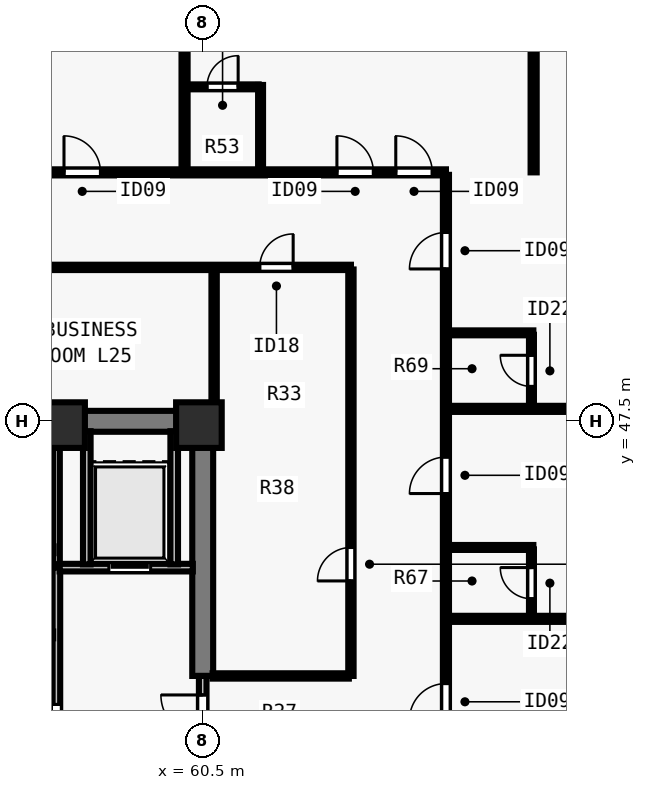
"""IFC4 building model, lengths in metres.
Left out: names, types, materials, properties, quantities, classifications, styles, units other than length and angle.
Written with IfcOpenShell. Run it as: python <this file> out.ifc"""

import sys

from ifc_helpers import new_model, si_unit, direction, frame, frame_2d, origin, origin_2d, place, context, subcontext, project, spatial, rectangle, extrude, element, fill, save


model = new_model("IFC4")
c1 = context("Model", 3, precision=1e-05, world=origin(), true_north=direction((0.0, 1.0)))
c2 = subcontext(c1, "Body", "Model", "MODEL_VIEW")
j1 = project(units=[si_unit("LENGTHUNIT", "METRE"), si_unit("PLANEANGLEUNIT", "RADIAN")], contexts=[c1])
p1 = place(None, origin())
s1 = spatial("IfcSite", under=j1, at=p1, CompositionType="ELEMENT")
p2 = place(p1, origin())
s2 = spatial("IfcBuilding", under=s1, at=p2, CompositionType="ELEMENT")
p3 = place(p2, frame((0.0, 0.0, 93.5)))
s3 = spatial("IfcBuildingStorey", under=s2, at=p3, CompositionType="ELEMENT", Elevation=93.5)
for number, where, z_axis, x_axis in (
    (1, (56.8, 47.4, 0.0), (0.0, 0.0, 1.0), (1.0, 0.0, 0.0)),
    (2, (60.4, 47.4, 0.0), (0.0, 0.0, 1.0), (1.0, 0.0, 0.0)),
):
    element("IfcColumn", number, at=place(p3, frame(where, z_axis=z_axis, x_axis=x_axis)), inside=s3, PredefinedType="COLUMN", context=c2, shape_type="SweptSolid", body=[
        extrude(rectangle(XDim=1.2, YDim=1.2, at=origin_2d()), origin(), (0.0, 0.0, 1.0), 3.5),
    ])
p4 = place(p3, frame((43.225, 47.5, 0.0), z_axis=(0.0, 0.0, 1.0), x_axis=(1.0, 0.0, 0.0)))
e3 = element("IfcWall", 3, at=p4, inside=s3, PredefinedType="SHEAR", context=c2, shape_type="SweptSolid", body=[
    extrude(rectangle(XDim=17.55, YDim=0.55, at=frame_2d((8.775, 0.0))), origin(), (0.0, 0.0, 1.0), 3.24),
])
p5 = place(p3, frame((60.5, 40.8, 0.0), z_axis=(0.0, 0.0, 1.0), x_axis=(0.0, 1.0, 0.0)))
e4 = element("IfcWall", 4, at=p5, inside=s3, PredefinedType="SHEAR", context=c2, shape_type="SweptSolid", body=[
    extrude(rectangle(XDim=6.435, YDim=0.55, at=frame_2d((3.218, 0.0))), origin(), (0.0, 0.0, 1.0), 3.24),
])
p6 = place(p3, frame((53.7, 40.5, 0.0), z_axis=(0.0, 0.0, 1.0), x_axis=(1.0, 0.0, 0.0)))
e5 = element("IfcWall", 5, at=p6, inside=s3, PredefinedType="SOLIDWALL", context=c2, shape_type="SweptSolid", body=[
    extrude(rectangle(XDim=2.95, YDim=0.2, at=frame_2d((1.475, 0.0))), origin(), (0.0, 0.0, 1.0), 3.24),
])
p7 = place(p3, frame((60.5, 38.75, 0.0), z_axis=(0.0, 0.0, 1.0), x_axis=(0.0, 1.0, 0.0)))
e6 = element("IfcWall", 6, at=p7, inside=s3, PredefinedType="SOLIDWALL", context=c2, shape_type="SweptSolid", body=[
    extrude(rectangle(XDim=2.05, YDim=0.2, at=frame_2d((1.025, 0.0))), origin(), (0.0, 0.0, 1.0), 3.24),
])
p8 = place(p7, frame((0.45, 0.0, 0.0)))
e7 = element("IfcOpeningElement", 7, at=p8, cuts=e6, PredefinedType="OPENING", context=c2, shape_type="SweptSolid", body=[
    extrude(rectangle(XDim=1.1, YDim=2.15, at=frame_2d((0.55, 1.075))), frame((0.0, 0.11, 0.0), z_axis=(0.0, -1.0, 0.0), x_axis=(1.0, 0.0, 0.0)), (0.0, 0.0, 1.0), 0.22),
])
p9 = place(p3, frame((56.65, 38.785, 0.0), z_axis=(0.0, 0.0, 1.0), x_axis=(0.0, 1.0, 0.0)))
e8 = element("IfcWall", 8, at=p9, inside=s3, PredefinedType="SOLIDWALL", context=c2, shape_type="SweptSolid", body=[
    extrude(rectangle(XDim=4.865, YDim=0.2, at=frame_2d((2.433, 0.0))), origin(), (0.0, 0.0, 1.0), 3.24),
])
p10 = place(p9, frame((0.265, 0.0, 0.0)))
e9 = element("IfcOpeningElement", 9, at=p10, cuts=e8, PredefinedType="OPENING", context=c2, shape_type="SweptSolid", body=[
    extrude(rectangle(XDim=1.0, YDim=2.15, at=frame_2d((0.5, 1.075))), frame((0.0, 0.11, 0.0), z_axis=(0.0, -1.0, 0.0), x_axis=(1.0, 0.0, 0.0)), (0.0, 0.0, 1.0), 0.22),
])
p11 = place(p3, frame((56.735, 43.65, 0.0), z_axis=(0.0, 0.0, 1.0), x_axis=(1.0, 0.0, 0.0)))
e10 = element("IfcWall", 10, at=p11, inside=s3, PredefinedType="SOLIDWALL", context=c2, shape_type="SweptSolid", body=[
    extrude(rectangle(XDim=3.505, YDim=0.2, at=frame_2d((1.752, 0.0))), origin(), (0.0, 0.0, 1.0), 3.24),
])
p12 = place(p11, frame((1.295, 0.0, 0.0)))
e11 = element("IfcOpeningElement", 11, at=p12, cuts=e10, PredefinedType="OPENING", context=c2, shape_type="SweptSolid", body=[
    extrude(rectangle(XDim=1.1, YDim=2.2, at=frame_2d((0.55, 1.1))), frame((0.0, 0.11, 0.0), z_axis=(0.0, -1.0, 0.0), x_axis=(1.0, 0.0, 0.0)), (0.0, 0.0, 1.0), 0.22),
])
for number, where, z_axis, x_axis in (
    (12, (57.45, 43.735, 0.0), (0.0, 0.0, 1.0), (0.0, 1.0, 0.0)),
    (13, (59.75, 43.735, 0.0), (0.0, 0.0, 1.0), (0.0, 1.0, 0.0)),
):
    element("IfcWall", number, at=place(p3, frame(where, z_axis=z_axis, x_axis=x_axis)), inside=s3, PredefinedType="SOLIDWALL", context=c2, shape_type="SweptSolid", body=[
        extrude(rectangle(XDim=3.505, YDim=0.2, at=frame_2d((1.752, 0.0))), origin(), (0.0, 0.0, 1.0), 3.24),
    ])
p13 = place(p3, frame((56.65, 43.735, 0.0), z_axis=(0.0, 0.0, 1.0), x_axis=(0.0, 1.0, 0.0)))
e14 = element("IfcWall", 14, at=p13, inside=s3, PredefinedType="SOLIDWALL", context=c2, shape_type="SweptSolid", body=[
    extrude(rectangle(XDim=3.505, YDim=0.18, at=frame_2d((1.752, 0.0))), origin(), (0.0, 0.0, 1.0), 3.24),
])
p14 = place(p3, frame((53.785, 41.88, 0.0), z_axis=(0.0, 0.0, 1.0), x_axis=(1.0, 0.0, 0.0)))
e15 = element("IfcWall", 15, at=p14, inside=s3, PredefinedType="SOLIDWALL", context=c2, shape_type="SweptSolid", body=[
    extrude(rectangle(XDim=2.78, YDim=0.18, at=frame_2d((1.39, 0.0))), origin(), (0.0, 0.0, 1.0), 3.24),
])
p15 = place(p3, frame((53.785, 44.12, 0.0), z_axis=(0.0, 0.0, 1.0), x_axis=(1.0, 0.0, 0.0)))
e16 = element("IfcWall", 16, at=p15, inside=s3, PredefinedType="SOLIDWALL", context=c2, shape_type="SweptSolid", body=[
    extrude(rectangle(XDim=2.79, YDim=0.18, at=frame_2d((1.395, 0.0))), origin(), (0.0, 0.0, 1.0), 3.24),
])
p16 = place(p3, frame((37.1, 54.05, 0.0), z_axis=(0.0, 0.0, 1.0), x_axis=(1.0, 0.0, 0.0)))
e17 = element("IfcWall", 17, at=p16, inside=s3, PredefinedType="PARTITIONING", context=c2, shape_type="SweptSolid", body=[
    extrude(rectangle(XDim=29.8, YDim=0.16, at=frame_2d((14.9, 0.0))), origin(), (0.0, 0.0, 1.0), 3.24),
])
p17 = place(p16, frame((0.91, 0.0, 0.0)))
e18 = element("IfcOpeningElement", 18, at=p17, cuts=e17, PredefinedType="OPENING", context=c2, shape_type="SweptSolid", body=[
    extrude(rectangle(XDim=0.96, YDim=2.15, at=frame_2d((0.48, 1.075))), frame((0.0, 0.09, 0.0), z_axis=(0.0, -1.0, 0.0), x_axis=(1.0, 0.0, 0.0)), (0.0, 0.0, 1.0), 0.18),
])
p18 = place(p16, frame((3.03, 0.0, 0.0)))
e19 = element("IfcOpeningElement", 19, at=p18, cuts=e17, PredefinedType="OPENING", context=c2, shape_type="SweptSolid", body=[
    extrude(rectangle(XDim=0.96, YDim=2.15, at=frame_2d((0.48, 1.075))), frame((0.0, 0.09, 0.0), z_axis=(0.0, -1.0, 0.0), x_axis=(1.0, 0.0, 0.0)), (0.0, 0.0, 1.0), 0.18),
])
p19 = place(p16, frame((11.39, 0.0, 0.0)))
e20 = element("IfcOpeningElement", 20, at=p19, cuts=e17, PredefinedType="OPENING", context=c2, shape_type="SweptSolid", body=[
    extrude(rectangle(XDim=0.96, YDim=2.15, at=frame_2d((0.48, 1.075))), frame((0.0, 0.09, 0.0), z_axis=(0.0, -1.0, 0.0), x_axis=(1.0, 0.0, 0.0)), (0.0, 0.0, 1.0), 0.18),
])
p20 = place(p16, frame((19.75, 0.0, 0.0)))
e21 = element("IfcOpeningElement", 21, at=p20, cuts=e17, PredefinedType="OPENING", context=c2, shape_type="SweptSolid", body=[
    extrude(rectangle(XDim=0.96, YDim=2.15, at=frame_2d((0.48, 1.075))), frame((0.0, 0.09, 0.0), z_axis=(0.0, -1.0, 0.0), x_axis=(1.0, 0.0, 0.0)), (0.0, 0.0, 1.0), 0.18),
])
p21 = place(p16, frame((26.931, 0.0, 0.0)))
e22 = element("IfcOpeningElement", 22, at=p21, cuts=e17, PredefinedType="OPENING", context=c2, shape_type="SweptSolid", body=[
    extrude(rectangle(XDim=0.96, YDim=2.15, at=frame_2d((0.48, 1.075))), frame((0.0, 0.09, 0.0), z_axis=(0.0, -1.0, 0.0), x_axis=(1.0, 0.0, 0.0)), (0.0, 0.0, 1.0), 0.18),
])
p22 = place(p16, frame((28.48, 0.0, 0.0)))
e23 = element("IfcOpeningElement", 23, at=p22, cuts=e17, PredefinedType="OPENING", context=c2, shape_type="SweptSolid", body=[
    extrude(rectangle(XDim=0.96, YDim=2.15, at=frame_2d((0.48, 1.075))), frame((0.0, 0.09, 0.0), z_axis=(0.0, -1.0, 0.0), x_axis=(1.0, 0.0, 0.0)), (0.0, 0.0, 1.0), 0.18),
])
p23 = place(p3, frame((66.9, 24.015, 0.0), z_axis=(0.0, 0.0, 1.0), x_axis=(0.0, 1.0, 0.0)))
e24 = element("IfcWall", 24, at=p23, inside=s3, PredefinedType="PARTITIONING", context=c2, shape_type="SweptSolid", body=[
    extrude(rectangle(XDim=29.97, YDim=0.16, at=frame_2d((14.985, 0.0))), origin(), (0.0, 0.0, 1.0), 3.24),
])
p24 = place(p23, frame((3.911, 0.0, 0.0)))
e25 = element("IfcOpeningElement", 25, at=p24, cuts=e24, PredefinedType="OPENING", context=c2, shape_type="SweptSolid", body=[
    extrude(rectangle(XDim=0.96, YDim=2.15, at=frame_2d((0.48, 1.075))), frame((0.0, 0.09, 0.0), z_axis=(0.0, -1.0, 0.0), x_axis=(1.0, 0.0, 0.0)), (0.0, 0.0, 1.0), 0.18),
])
p25 = place(p23, frame((9.544, 0.0, 0.0)))
e26 = element("IfcOpeningElement", 26, at=p25, cuts=e24, PredefinedType="OPENING", context=c2, shape_type="SweptSolid", body=[
    extrude(rectangle(XDim=0.96, YDim=2.15, at=frame_2d((0.48, 1.075))), frame((0.0, 0.09, 0.0), z_axis=(0.0, -1.0, 0.0), x_axis=(1.0, 0.0, 0.0)), (0.0, 0.0, 1.0), 0.18),
])
p26 = place(p23, frame((15.625, 0.0, 0.0)))
e27 = element("IfcOpeningElement", 27, at=p26, cuts=e24, PredefinedType="OPENING", context=c2, shape_type="SweptSolid", body=[
    extrude(rectangle(XDim=0.96, YDim=2.15, at=frame_2d((0.48, 1.075))), frame((0.0, 0.09, 0.0), z_axis=(0.0, -1.0, 0.0), x_axis=(1.0, 0.0, 0.0)), (0.0, 0.0, 1.0), 0.18),
])
p27 = place(p23, frame((21.584, 0.0, 0.0)))
e28 = element("IfcOpeningElement", 28, at=p27, cuts=e24, PredefinedType="OPENING", context=c2, shape_type="SweptSolid", body=[
    extrude(rectangle(XDim=0.96, YDim=2.15, at=frame_2d((0.48, 1.075))), frame((0.0, 0.09, 0.0), z_axis=(0.0, -1.0, 0.0), x_axis=(1.0, 0.0, 0.0)), (0.0, 0.0, 1.0), 0.18),
])
p28 = place(p23, frame((27.494, 0.0, 0.0)))
e29 = element("IfcOpeningElement", 29, at=p28, cuts=e24, PredefinedType="OPENING", context=c2, shape_type="SweptSolid", body=[
    extrude(rectangle(XDim=0.96, YDim=2.15, at=frame_2d((0.48, 1.075))), frame((0.0, 0.09, 0.0), z_axis=(0.0, -1.0, 0.0), x_axis=(1.0, 0.0, 0.0)), (0.0, 0.0, 1.0), 0.18),
])
p29 = place(p3, frame((39.6, 51.55, 0.0), z_axis=(0.0, 0.0, 1.0), x_axis=(1.0, 0.0, 0.0)))
e30 = element("IfcWall", 30, at=p29, inside=s3, PredefinedType="PARTITIONING", context=c2, shape_type="SweptSolid", body=[
    extrude(rectangle(XDim=24.8, YDim=0.14, at=frame_2d((12.4, 0.0))), origin(), (0.0, 0.0, 1.0), 3.24),
])
p30 = place(p29, frame((2.2, 0.0, 0.0)))
e31 = element("IfcOpeningElement", 31, at=p30, cuts=e30, PredefinedType="OPENING", context=c2, shape_type="SweptSolid", body=[
    extrude(rectangle(XDim=0.88, YDim=2.1, at=frame_2d((0.44, 1.05))), frame((0.0, 0.08, 0.0), z_axis=(0.0, -1.0, 0.0), x_axis=(1.0, 0.0, 0.0)), (0.0, 0.0, 1.0), 0.16),
])
p31 = place(p29, frame((12.9, 0.0, 0.0)))
e32 = element("IfcOpeningElement", 32, at=p31, cuts=e30, PredefinedType="OPENING", context=c2, shape_type="SweptSolid", body=[
    extrude(rectangle(XDim=0.88, YDim=2.1, at=frame_2d((0.44, 1.05))), frame((0.0, 0.08, 0.0), z_axis=(0.0, -1.0, 0.0), x_axis=(1.0, 0.0, 0.0)), (0.0, 0.0, 1.0), 0.16),
])
p32 = place(p29, frame((22.4, 0.0, 0.0)))
e33 = element("IfcOpeningElement", 33, at=p32, cuts=e30, PredefinedType="OPENING", context=c2, shape_type="SweptSolid", body=[
    extrude(rectangle(XDim=0.88, YDim=2.1, at=frame_2d((0.44, 1.05))), frame((0.0, 0.08, 0.0), z_axis=(0.0, -1.0, 0.0), x_axis=(1.0, 0.0, 0.0)), (0.0, 0.0, 1.0), 0.16),
])
p33 = place(p3, frame((64.4, 40.8, 0.0), z_axis=(0.0, 0.0, 1.0), x_axis=(0.0, 1.0, 0.0)))
e34 = element("IfcWall", 34, at=p33, inside=s3, PredefinedType="PARTITIONING", context=c2, shape_type="SweptSolid", body=[
    extrude(rectangle(XDim=10.695, YDim=0.14, at=frame_2d((5.348, 0.0))), origin(), (0.0, 0.0, 1.0), 3.24),
])
p34 = place(p33, frame((2.5, 0.0, 0.0)))
e35 = element("IfcOpeningElement", 35, at=p34, cuts=e34, PredefinedType="OPENING", context=c2, shape_type="SweptSolid", body=[
    extrude(rectangle(XDim=0.88, YDim=2.1, at=frame_2d((0.44, 1.05))), frame((0.0, 0.08, 0.0), z_axis=(0.0, -1.0, 0.0), x_axis=(1.0, 0.0, 0.0)), (0.0, 0.0, 1.0), 0.16),
])
p35 = place(p3, frame((60.76, 40.8, 0.0), z_axis=(0.0, 0.0, 1.0), x_axis=(1.0, 0.0, 0.0)))
e36 = element("IfcWall", 36, at=p35, inside=s3, PredefinedType="PARTITIONING", context=c2, shape_type="SweptSolid", body=[
    extrude(rectangle(XDim=3.585, YDim=0.14, at=frame_2d((1.792, 0.0))), origin(), (0.0, 0.0, 1.0), 3.24),
])
p36 = place(p3, frame((60.8, 47.76, 0.0), z_axis=(0.0, 0.0, 1.0), x_axis=(0.0, 1.0, 0.0)))
e37 = element("IfcWall", 37, at=p36, inside=s3, PredefinedType="PARTITIONING", context=c2, shape_type="SweptSolid", body=[
    extrude(rectangle(XDim=3.735, YDim=0.14, at=frame_2d((1.868, 0.0))), origin(), (0.0, 0.0, 1.0), 2.399),
])
p37 = place(p3, frame((60.022, 54.115, 0.0), z_axis=(0.0, 0.0, 1.0), x_axis=(0.0, 1.0, 0.0)))
e38 = element("IfcWall", 38, at=p37, inside=s3, PredefinedType="PARTITIONING", context=c2, shape_type="SweptSolid", body=[
    extrude(rectangle(XDim=9.97, YDim=0.16, at=frame_2d((4.985, 0.0))), origin(), (0.0, 0.0, 1.0), 3.24),
])
p38 = place(p3, frame((62.022, 54.115, 0.0), z_axis=(0.0, 0.0, 1.0), x_axis=(0.0, 1.0, 0.0)))
e39 = element("IfcWall", 39, at=p38, inside=s3, PredefinedType="PLUMBINGWALL", context=c2, shape_type="SweptSolid", body=[
    extrude(rectangle(XDim=2.235, YDim=0.13, at=frame_2d((1.118, 0.0))), origin(), (0.0, 0.0, 1.0), 3.24),
])
p39 = place(p3, frame((60.087, 56.3, 0.0), z_axis=(0.0, 0.0, 1.0), x_axis=(1.0, 0.0, 0.0)))
e40 = element("IfcWall", 40, at=p39, inside=s3, PredefinedType="PLUMBINGWALL", context=c2, shape_type="SweptSolid", body=[
    extrude(rectangle(XDim=1.885, YDim=0.13, at=frame_2d((0.942, 0.0))), origin(), (0.0, 0.0, 1.0), 3.24),
])
p40 = place(p39, frame((0.525, 0.0, 0.0)))
e41 = element("IfcOpeningElement", 41, at=p40, cuts=e40, PredefinedType="OPENING", context=c2, shape_type="SweptSolid", body=[
    extrude(rectangle(XDim=0.82, YDim=2.1, at=frame_2d((0.41, 1.05))), frame((0.0, 0.075, 0.0), z_axis=(0.0, -1.0, 0.0), x_axis=(1.0, 0.0, 0.0)), (0.0, 0.0, 1.0), 0.15),
])
p41 = place(p3, frame((69.208, 54.05, 0.0), z_axis=(0.0, 0.0, 1.0), x_axis=(0.0, 1.0, 0.0)))
e42 = element("IfcWall", 42, at=p41, inside=s3, PredefinedType="PARTITIONING", context=c2, shape_type="SweptSolid", body=[
    extrude(rectangle(XDim=10.105, YDim=0.16, at=frame_2d((5.052, 0.0))), origin(), (0.0, 0.0, 1.0), 2.399),
])
p42 = place(p3, frame((66.965, 42.302, 0.0), z_axis=(0.0, 0.0, 1.0), x_axis=(1.0, 0.0, 0.0)))
e43 = element("IfcWall", 43, at=p42, inside=s3, PredefinedType="PARTITIONING", context=c2, shape_type="SweptSolid", body=[
    extrude(rectangle(XDim=10.19, YDim=0.16, at=frame_2d((5.095, 0.0))), origin(), (0.0, 0.0, 1.0), 3.24),
])
p43 = place(p3, frame((66.965, 44.181, 0.0), z_axis=(0.0, 0.0, 1.0), x_axis=(1.0, 0.0, 0.0)))
e44 = element("IfcWall", 44, at=p43, inside=s3, PredefinedType="PLUMBINGWALL", context=c2, shape_type="SweptSolid", body=[
    extrude(rectangle(XDim=2.235, YDim=0.13, at=frame_2d((1.117, 0.0))), origin(), (0.0, 0.0, 1.0), 3.24),
])
p44 = place(p3, frame((69.15, 42.367, 0.0), z_axis=(0.0, 0.0, 1.0), x_axis=(0.0, 1.0, 0.0)))
e45 = element("IfcWall", 45, at=p44, inside=s3, PredefinedType="PLUMBINGWALL", context=c2, shape_type="SweptSolid", body=[
    extrude(rectangle(XDim=1.764, YDim=0.13, at=frame_2d((0.882, 0.0))), origin(), (0.0, 0.0, 1.0), 3.24),
])
p45 = place(p44, frame((0.464, 0.0, 0.0)))
e46 = element("IfcOpeningElement", 46, at=p45, cuts=e45, PredefinedType="OPENING", context=c2, shape_type="SweptSolid", body=[
    extrude(rectangle(XDim=0.82, YDim=2.1, at=frame_2d((0.41, 1.05))), frame((0.0, 0.075, 0.0), z_axis=(0.0, -1.0, 0.0), x_axis=(1.0, 0.0, 0.0)), (0.0, 0.0, 1.0), 0.15),
])
p46 = place(p3, frame((66.965, 47.827, 0.0), z_axis=(0.0, 0.0, 1.0), x_axis=(1.0, 0.0, 0.0)))
e47 = element("IfcWall", 47, at=p46, inside=s3, PredefinedType="PARTITIONING", context=c2, shape_type="SweptSolid", body=[
    extrude(rectangle(XDim=10.19, YDim=0.16, at=frame_2d((5.095, 0.0))), origin(), (0.0, 0.0, 1.0), 3.24),
])
p47 = place(p3, frame((66.965, 49.827, 0.0), z_axis=(0.0, 0.0, 1.0), x_axis=(1.0, 0.0, 0.0)))
e48 = element("IfcWall", 48, at=p47, inside=s3, PredefinedType="PLUMBINGWALL", context=c2, shape_type="SweptSolid", body=[
    extrude(rectangle(XDim=2.235, YDim=0.13, at=frame_2d((1.117, 0.0))), origin(), (0.0, 0.0, 1.0), 3.24),
])
p48 = place(p3, frame((69.15, 47.893, 0.0), z_axis=(0.0, 0.0, 1.0), x_axis=(0.0, 1.0, 0.0)))
e49 = element("IfcWall", 49, at=p48, inside=s3, PredefinedType="PLUMBINGWALL", context=c2, shape_type="SweptSolid", body=[
    extrude(rectangle(XDim=1.885, YDim=0.13, at=frame_2d((0.942, 0.0))), origin(), (0.0, 0.0, 1.0), 3.24),
])
p49 = place(p48, frame((0.525, 0.0, 0.0)))
e50 = element("IfcOpeningElement", 50, at=p49, cuts=e49, PredefinedType="OPENING", context=c2, shape_type="SweptSolid", body=[
    extrude(rectangle(XDim=0.82, YDim=2.1, at=frame_2d((0.41, 1.05))), frame((0.0, 0.075, 0.0), z_axis=(0.0, -1.0, 0.0), x_axis=(1.0, 0.0, 0.0)), (0.0, 0.0, 1.0), 0.15),
])
p50 = place(p8, origin())
e51 = element("IfcDoor", 51, at=p50, inside=s3, OperationType="SINGLE_SWING_RIGHT", PredefinedType="DOOR", context=c2, shape_type="SweptSolid", body=[
    extrude(rectangle(XDim=1.1, YDim=2.15, at=frame_2d((0.55, 1.075))), frame((0.0, 0.025, 0.0), z_axis=(0.0, -1.0, 0.0), x_axis=(1.0, 0.0, 0.0)), (0.0, 0.0, 1.0), 0.05),
])
fill(e7, e51)
p51 = place(p10, origin())
e52 = element("IfcDoor", 52, at=p51, inside=s3, OperationType="SINGLE_SWING_LEFT", PredefinedType="DOOR", context=c2, shape_type="SweptSolid", body=[
    extrude(rectangle(XDim=1.0, YDim=2.15, at=frame_2d((0.5, 1.075))), frame((0.0, 0.025, 0.0), z_axis=(0.0, -1.0, 0.0), x_axis=(1.0, 0.0, 0.0)), (0.0, 0.0, 1.0), 0.05),
])
fill(e9, e52)
p52 = place(p12, origin())
e53 = element("IfcDoor", 53, at=p52, inside=s3, OperationType="SLIDING_TO_LEFT", PredefinedType="DOOR", context=c2, shape_type="SweptSolid", body=[
    extrude(rectangle(XDim=1.1, YDim=2.2, at=frame_2d((0.55, 1.1))), frame((0.0, 0.025, 0.0), z_axis=(0.0, -1.0, 0.0), x_axis=(1.0, 0.0, 0.0)), (0.0, 0.0, 1.0), 0.05),
])
fill(e11, e53)
p53 = place(p32, origin())
e54 = element("IfcDoor", 54, at=p53, inside=s3, OperationType="SINGLE_SWING_RIGHT", PredefinedType="DOOR", context=c2, shape_type="SweptSolid", body=[
    extrude(rectangle(XDim=0.88, YDim=2.1, at=frame_2d((0.44, 1.05))), frame((0.0, 0.025, 0.0), z_axis=(0.0, -1.0, 0.0), x_axis=(1.0, 0.0, 0.0)), (0.0, 0.0, 1.0), 0.05),
])
fill(e33, e54)
p54 = place(p34, origin())
e55 = element("IfcDoor", 55, at=p54, inside=s3, OperationType="SINGLE_SWING_LEFT", PredefinedType="DOOR", context=c2, shape_type="SweptSolid", body=[
    extrude(rectangle(XDim=0.88, YDim=2.1, at=frame_2d((0.44, 1.05))), frame((0.0, 0.025, 0.0), z_axis=(0.0, -1.0, 0.0), x_axis=(1.0, 0.0, 0.0)), (0.0, 0.0, 1.0), 0.05),
])
fill(e35, e55)
p55 = place(p20, origin())
e56 = element("IfcDoor", 56, at=p55, inside=s3, OperationType="SINGLE_SWING_LEFT", PredefinedType="DOOR", context=c2, shape_type="SweptSolid", body=[
    extrude(rectangle(XDim=0.96, YDim=2.15, at=frame_2d((0.48, 1.075))), frame((0.0, 0.025, 0.0), z_axis=(0.0, -1.0, 0.0), x_axis=(1.0, 0.0, 0.0)), (0.0, 0.0, 1.0), 0.05),
])
fill(e21, e56)
p56 = place(p40, origin())
e57 = element("IfcDoor", 57, at=p56, inside=s3, OperationType="SINGLE_SWING_RIGHT", PredefinedType="DOOR", context=c2, shape_type="SweptSolid", body=[
    extrude(rectangle(XDim=0.82, YDim=2.1, at=frame_2d((0.41, 1.05))), frame((0.0, 0.025, 0.0), z_axis=(0.0, -1.0, 0.0), x_axis=(1.0, 0.0, 0.0)), (0.0, 0.0, 1.0), 0.05),
])
fill(e41, e57)
p57 = place(p21, origin())
e58 = element("IfcDoor", 58, at=p57, inside=s3, OperationType="SINGLE_SWING_LEFT", PredefinedType="DOOR", context=c2, shape_type="SweptSolid", body=[
    extrude(rectangle(XDim=0.96, YDim=2.15, at=frame_2d((0.48, 1.075))), frame((0.0, 0.025, 0.0), z_axis=(0.0, -1.0, 0.0), x_axis=(1.0, 0.0, 0.0)), (0.0, 0.0, 1.0), 0.05),
])
fill(e22, e58)
p58 = place(p22, origin())
e59 = element("IfcDoor", 59, at=p58, inside=s3, OperationType="SINGLE_SWING_LEFT", PredefinedType="DOOR", context=c2, shape_type="SweptSolid", body=[
    extrude(rectangle(XDim=0.96, YDim=2.15, at=frame_2d((0.48, 1.075))), frame((0.0, 0.025, 0.0), z_axis=(0.0, -1.0, 0.0), x_axis=(1.0, 0.0, 0.0)), (0.0, 0.0, 1.0), 0.05),
])
fill(e23, e59)
p59 = place(p26, origin())
e60 = element("IfcDoor", 60, at=p59, inside=s3, OperationType="SINGLE_SWING_LEFT", PredefinedType="DOOR", context=c2, shape_type="SweptSolid", body=[
    extrude(rectangle(XDim=0.96, YDim=2.15, at=frame_2d((0.48, 1.075))), frame((0.0, 0.025, 0.0), z_axis=(0.0, -1.0, 0.0), x_axis=(1.0, 0.0, 0.0)), (0.0, 0.0, 1.0), 0.05),
])
fill(e27, e60)
p60 = place(p45, origin())
e61 = element("IfcDoor", 61, at=p60, inside=s3, OperationType="SINGLE_SWING_RIGHT", PredefinedType="DOOR", context=c2, shape_type="SweptSolid", body=[
    extrude(rectangle(XDim=0.82, YDim=2.1, at=frame_2d((0.41, 1.05))), frame((0.0, 0.025, 0.0), z_axis=(0.0, -1.0, 0.0), x_axis=(1.0, 0.0, 0.0)), (0.0, 0.0, 1.0), 0.05),
])
fill(e46, e61)
p61 = place(p27, origin())
e62 = element("IfcDoor", 62, at=p61, inside=s3, OperationType="SINGLE_SWING_LEFT", PredefinedType="DOOR", context=c2, shape_type="SweptSolid", body=[
    extrude(rectangle(XDim=0.96, YDim=2.15, at=frame_2d((0.48, 1.075))), frame((0.0, 0.025, 0.0), z_axis=(0.0, -1.0, 0.0), x_axis=(1.0, 0.0, 0.0)), (0.0, 0.0, 1.0), 0.05),
])
fill(e28, e62)
p62 = place(p49, origin())
e63 = element("IfcDoor", 63, at=p62, inside=s3, OperationType="SINGLE_SWING_RIGHT", PredefinedType="DOOR", context=c2, shape_type="SweptSolid", body=[
    extrude(rectangle(XDim=0.82, YDim=2.1, at=frame_2d((0.41, 1.05))), frame((0.0, 0.025, 0.0), z_axis=(0.0, -1.0, 0.0), x_axis=(1.0, 0.0, 0.0)), (0.0, 0.0, 1.0), 0.05),
])
fill(e50, e63)
p63 = place(p28, origin())
e64 = element("IfcDoor", 64, at=p63, inside=s3, OperationType="SINGLE_SWING_LEFT", PredefinedType="DOOR", context=c2, shape_type="SweptSolid", body=[
    extrude(rectangle(XDim=0.96, YDim=2.15, at=frame_2d((0.48, 1.075))), frame((0.0, 0.025, 0.0), z_axis=(0.0, -1.0, 0.0), x_axis=(1.0, 0.0, 0.0)), (0.0, 0.0, 1.0), 0.05),
])
fill(e29, e64)
save(model, sys.argv[1])
